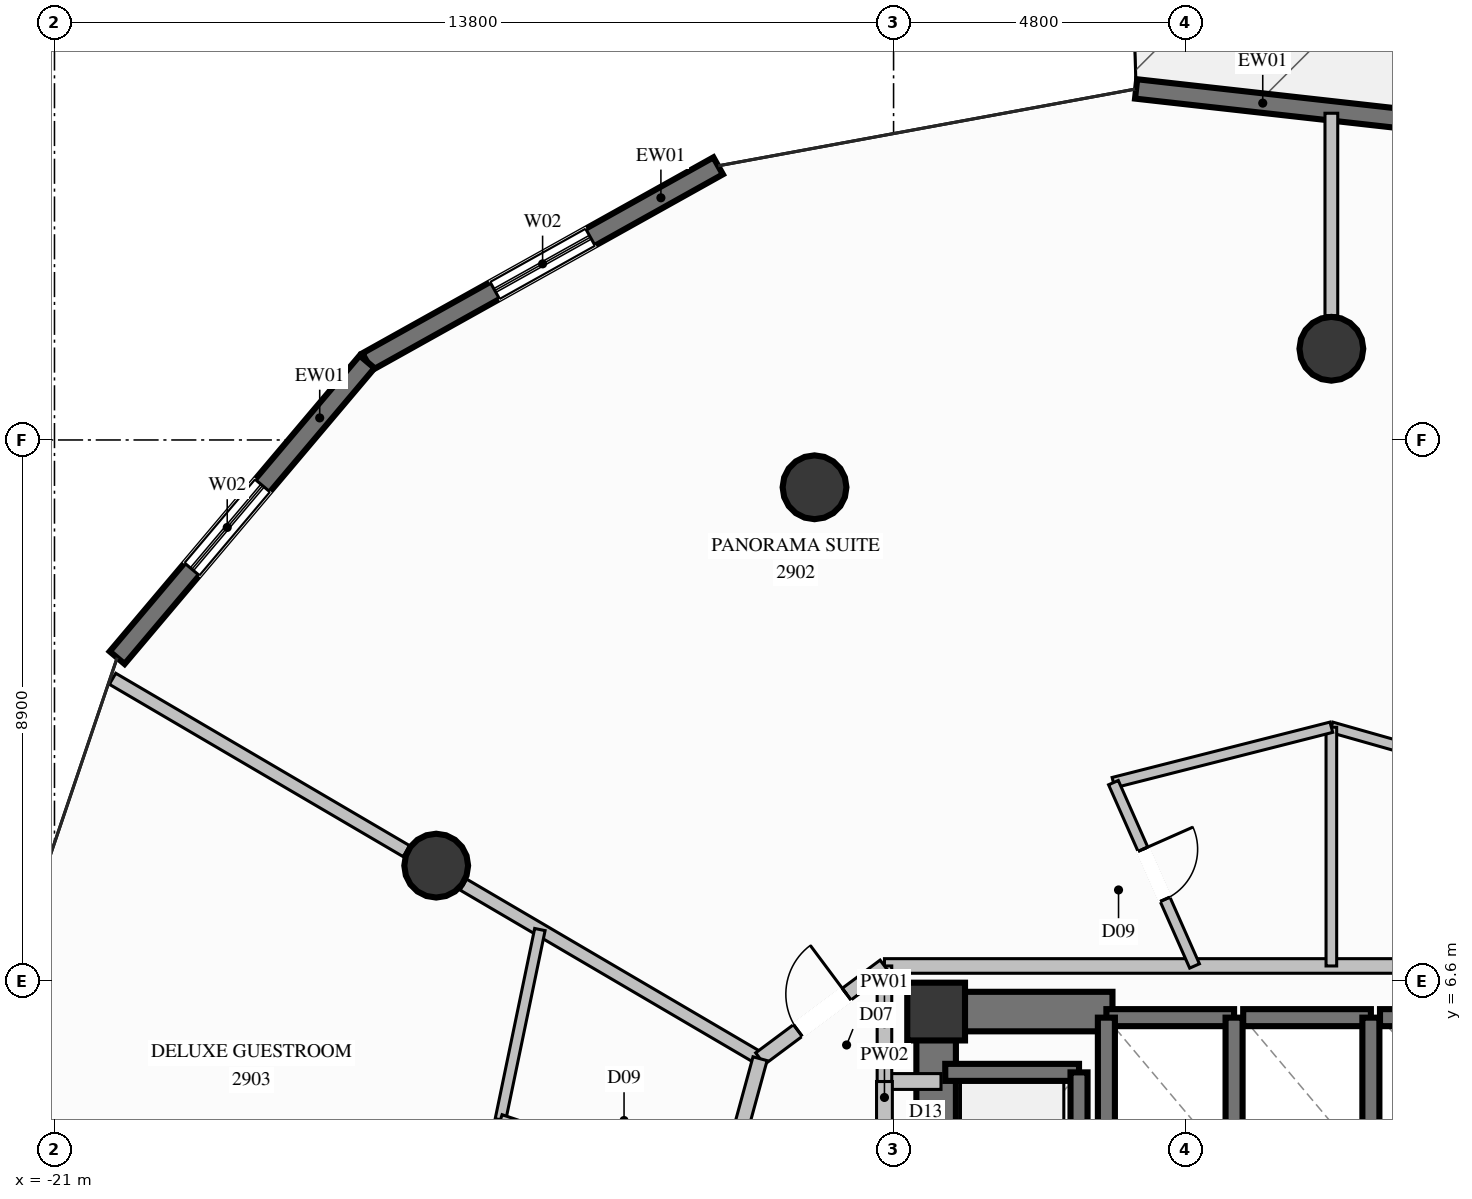
"""IFC4 building model, lengths in metres.
Left out: names, types, materials, properties, quantities, classifications, styles, units other than length and angle.
Written with IfcOpenShell. Run it as: python <this file> out.ifc"""

import sys

from ifc_helpers import new_model, si_unit, direction, frame, frame_2d, origin, origin_2d, place, context, subcontext, project, spatial, rectangle, circle, extrude, element, fill, save


model = new_model("IFC4")
c1 = context("Model", 3, precision=1e-05, world=origin(), true_north=direction((0.0, 1.0)))
c2 = subcontext(c1, "Body", "Model", "MODEL_VIEW")
j1 = project(units=[si_unit("LENGTHUNIT", "METRE"), si_unit("PLANEANGLEUNIT", "RADIAN")], contexts=[c1])
p1 = place(None, origin())
s1 = spatial("IfcSite", under=j1, at=p1, CompositionType="ELEMENT")
p2 = place(p1, origin())
s2 = spatial("IfcBuilding", under=s1, at=p2, CompositionType="ELEMENT")
p3 = place(p2, frame((0.0, 0.0, 109.8)))
s3 = spatial("IfcBuildingStorey", under=s2, at=p3, CompositionType="ELEMENT", Elevation=109.8)
p4 = place(p3, frame((-6.5, 6.1, 0.0), z_axis=(0.0, 0.0, 1.0), x_axis=(1.0, 0.0, 0.0)))
e1 = element("IfcColumn", 1, at=p4, inside=s3, PredefinedType="COLUMN", context=c2, shape_type="SweptSolid", body=[
    extrude(rectangle(XDim=0.95, YDim=0.95, at=origin_2d()), origin(), (0.0, 0.0, 1.0), 3.6),
])
p5 = place(p3, frame((-6.175, 6.1, 0.0), z_axis=(0.0, 0.0, 1.0), x_axis=(1.0, 0.0, 0.0)))
e2 = element("IfcWall", 2, at=p5, inside=s3, PredefinedType="SHEAR", context=c2, shape_type="SweptSolid", body=[
    extrude(rectangle(XDim=2.575, YDim=0.65, at=frame_2d((1.288, 0.0))), origin(), (0.0, 0.0, 1.0), 3.6),
])
p6 = place(p3, frame((-6.5, 2.35, 0.0), z_axis=(0.0, 0.0, 1.0), x_axis=(0.0, 1.0, 0.0)))
e3 = element("IfcWall", 3, at=p6, inside=s3, PredefinedType="SHEAR", context=c2, shape_type="SweptSolid", body=[
    extrude(rectangle(XDim=4.075, YDim=0.65, at=frame_2d((2.038, 0.0))), origin(), (0.0, 0.0, 1.0), 3.6),
])
for number, where, z_axis, x_axis in (
    (4, (0.0, 17.0, 0.0), (0.0, 0.0, 1.0), (1.0, 0.0, 0.0)),
    (5, (-8.5, 14.722, 0.0), (0.0, 0.0, 1.0), (1.0, 0.0, 0.0)),
    (6, (-14.722, 8.5, 0.0), (0.0, 0.0, 1.0), (1.0, 0.0, 0.0)),
):
    element("IfcColumn", number, at=place(p3, frame(where, z_axis=z_axis, x_axis=x_axis)), inside=s3, PredefinedType="COLUMN", context=c2, shape_type="SweptSolid", body=[
        extrude(circle(Radius=0.525, at=origin_2d()), origin(), (0.0, 0.0, 1.0), 3.6),
    ])
p7 = place(p3, frame((-3.211, 21.273, 0.0), z_axis=(0.0, 0.0, 1.0), x_axis=(0.993784044115, -0.111325081016, 0.0)))
e7 = element("IfcWall", 7, at=p7, inside=s3, PredefinedType="SOLIDWALL", context=c2, shape_type="SweptSolid", body=[
    extrude(rectangle(XDim=7.347, YDim=0.32, at=frame_2d((3.673, 0.0))), origin(), (0.0, 0.0, 1.0), 3.35),
])
p8 = place(p7, frame((4.441, 0.0, 0.35)))
e8 = element("IfcOpeningElement", 8, at=p8, cuts=e7, PredefinedType="OPENING", context=c2, shape_type="SweptSolid", body=[
    extrude(rectangle(XDim=1.8, YDim=2.6, at=frame_2d((0.9, 1.3))), frame((0.0, 0.17, 0.0), z_axis=(0.0, -1.0, 0.0), x_axis=(1.0, 0.0, 0.0)), (0.0, 0.0, 1.0), 0.34),
])
p9 = place(p3, frame((-15.859, 16.785, 0.0), z_axis=(0.0, 0.0, 1.0), x_axis=(0.873166276034, 0.487422459882, 0.0)))
e9 = element("IfcWall", 9, at=p9, inside=s3, PredefinedType="SOLIDWALL", context=c2, shape_type="SweptSolid", body=[
    extrude(rectangle(XDim=6.613, YDim=0.32, at=frame_2d((3.306, 0.0))), origin(), (0.0, 0.0, 1.0), 3.35),
])
p10 = place(p9, frame((2.406, 0.0, 0.35)))
e10 = element("IfcOpeningElement", 10, at=p10, cuts=e9, PredefinedType="OPENING", context=c2, shape_type="SweptSolid", body=[
    extrude(rectangle(XDim=1.8, YDim=2.6, at=frame_2d((0.9, 1.3))), frame((0.0, 0.17, 0.0), z_axis=(0.0, -1.0, 0.0), x_axis=(1.0, 0.0, 0.0)), (0.0, 0.0, 1.0), 0.34),
])
p11 = place(p3, frame((-19.969, 11.919, 0.0), z_axis=(0.0, 0.0, 1.0), x_axis=(0.645278763483, 0.763947195425, 0.0)))
e11 = element("IfcWall", 11, at=p11, inside=s3, PredefinedType="SOLIDWALL", context=c2, shape_type="SweptSolid", body=[
    extrude(rectangle(XDim=6.369, YDim=0.32, at=frame_2d((3.185, 0.0))), origin(), (0.0, 0.0, 1.0), 3.35),
])
p12 = place(p11, frame((1.905, 0.0, 0.35)))
e12 = element("IfcOpeningElement", 12, at=p12, cuts=e11, PredefinedType="OPENING", context=c2, shape_type="SweptSolid", body=[
    extrude(rectangle(XDim=1.8, YDim=2.6, at=frame_2d((0.9, 1.3))), frame((0.0, 0.17, 0.0), z_axis=(0.0, -1.0, 0.0), x_axis=(1.0, 0.0, 0.0)), (0.0, 0.0, 1.0), 0.34),
])
p13 = place(p3, frame((-1.6, 6.0, 0.0), z_axis=(0.0, 0.0, 1.0), x_axis=(-1.0, 0.0, 0.0)))
e13 = element("IfcWall", 13, at=p13, inside=s3, PredefinedType="SOLIDWALL", context=c2, shape_type="SweptSolid", body=[
    extrude(rectangle(XDim=2.1, YDim=0.28, at=frame_2d((1.05, 0.0))), origin(), (0.0, 0.0, 1.0), 3.35),
])
for number, where, z_axis, x_axis in (
    (14, (-3.7, 6.0, 0.0), (0.0, 0.0, 1.0), (0.0, -1.0, 0.0)),
    (15, (-1.6, 3.5, 0.0), (0.0, 0.0, 1.0), (0.0, 1.0, 0.0)),
):
    element("IfcWall", number, at=place(p3, frame(where, z_axis=z_axis, x_axis=x_axis)), inside=s3, PredefinedType="SOLIDWALL", context=c2, shape_type="SweptSolid", body=[
        extrude(rectangle(XDim=2.5, YDim=0.28, at=frame_2d((1.25, 0.0))), origin(), (0.0, 0.0, 1.0), 3.35),
    ])
p14 = place(p3, frame((0.65, 6.0, 0.0), z_axis=(0.0, 0.0, 1.0), x_axis=(-1.0, 0.0, 0.0)))
e16 = element("IfcWall", 16, at=p14, inside=s3, PredefinedType="SOLIDWALL", context=c2, shape_type="SweptSolid", body=[
    extrude(rectangle(XDim=2.1, YDim=0.28, at=frame_2d((1.05, 0.0))), origin(), (0.0, 0.0, 1.0), 3.35),
])
p15 = place(p3, frame((0.65, 3.5, 0.0), z_axis=(0.0, 0.0, 1.0), x_axis=(0.0, 1.0, 0.0)))
e17 = element("IfcWall", 17, at=p15, inside=s3, PredefinedType="SOLIDWALL", context=c2, shape_type="SweptSolid", body=[
    extrude(rectangle(XDim=2.5, YDim=0.28, at=frame_2d((1.25, 0.0))), origin(), (0.0, 0.0, 1.0), 3.35),
])
p16 = place(p3, frame((3.0, 6.0, 0.0), z_axis=(0.0, 0.0, 1.0), x_axis=(-1.0, 0.0, 0.0)))
e18 = element("IfcWall", 18, at=p16, inside=s3, PredefinedType="SOLIDWALL", context=c2, shape_type="SweptSolid", body=[
    extrude(rectangle(XDim=2.2, YDim=0.28, at=frame_2d((1.1, 0.0))), origin(), (0.0, 0.0, 1.0), 3.35),
])
p17 = place(p3, frame((-4.15, 5.1, 0.0), z_axis=(0.0, 0.0, 1.0), x_axis=(-1.0, 0.0, 0.0)))
e19 = element("IfcWall", 19, at=p17, inside=s3, PredefinedType="SOLIDWALL", context=c2, shape_type="SweptSolid", body=[
    extrude(rectangle(XDim=2.2, YDim=0.28, at=frame_2d((1.1, 0.0))), origin(), (0.0, 0.0, 1.0), 3.35),
])
p18 = place(p3, frame((-4.15, 2.4, 0.0), z_axis=(0.0, 0.0, 1.0), x_axis=(0.0, 1.0, 0.0)))
e20 = element("IfcWall", 20, at=p18, inside=s3, PredefinedType="SOLIDWALL", context=c2, shape_type="SweptSolid", body=[
    extrude(rectangle(XDim=2.7, YDim=0.28, at=frame_2d((1.35, 0.0))), origin(), (0.0, 0.0, 1.0), 3.35),
])
p19 = place(p3, frame((-7.35, 4.95, 0.0), z_axis=(0.0, 0.0, 1.0), x_axis=(1.0, 0.0, 0.0)))
e21 = element("IfcWall", 21, at=p19, inside=s3, PredefinedType="PARTITIONING", context=c2, shape_type="SweptSolid", body=[
    extrude(rectangle(XDim=0.93, YDim=0.26, at=frame_2d((0.465, 0.0))), origin(), (0.0, 0.0, 1.0), 3.35),
])
p20 = place(p3, frame((-7.35, 2.55, 0.0), z_axis=(0.0, 0.0, 1.0), x_axis=(0.0, 1.0, 0.0)))
e22 = element("IfcWall", 22, at=p20, inside=s3, PredefinedType="PARTITIONING", context=c2, shape_type="SweptSolid", body=[
    extrude(rectangle(XDim=2.4, YDim=0.26, at=frame_2d((1.2, 0.0))), origin(), (0.0, 0.0, 1.0), 2.435),
])
p21 = place(p20, frame((0.775, 0.0, 0.0)))
e23 = element("IfcOpeningElement", 23, at=p21, cuts=e22, PredefinedType="OPENING", context=c2, shape_type="SweptSolid", body=[
    extrude(rectangle(XDim=0.85, YDim=2.05, at=frame_2d((0.425, 1.025))), frame((0.0, 0.14, 0.0), z_axis=(0.0, -1.0, 0.0), x_axis=(1.0, 0.0, 0.0)), (0.0, 0.0, 1.0), 0.28),
])
p22 = place(p3, frame((-7.35, 6.85, 0.0), z_axis=(0.0, 0.0, 1.0), x_axis=(1.0, 0.0, 0.0)))
e24 = element("IfcWall", 24, at=p22, inside=s3, PredefinedType="PARTITIONING", context=c2, shape_type="SweptSolid", body=[
    extrude(rectangle(XDim=14.7, YDim=0.24, at=frame_2d((7.35, 0.0))), origin(), (0.0, 0.0, 1.0), 2.435),
])
p23 = place(p3, frame((-7.35, 4.95, 0.0), z_axis=(0.0, 0.0, 1.0), x_axis=(0.0, 1.0, 0.0)))
e25 = element("IfcWall", 25, at=p23, inside=s3, PredefinedType="PARTITIONING", context=c2, shape_type="SweptSolid", body=[
    extrude(rectangle(XDim=1.9, YDim=0.24, at=frame_2d((0.95, 0.0))), origin(), (0.0, 0.0, 1.0), 2.435),
])
p24 = place(p3, frame((-9.396, 5.325, 0.0), z_axis=(0.0, 0.0, 1.0), x_axis=(-0.862467386777, 0.50611264235, 0.0)))
e26 = element("IfcWall", 26, at=p24, inside=s3, PredefinedType="PARTITIONING", context=c2, shape_type="SweptSolid", body=[
    extrude(rectangle(XDim=5.657, YDim=0.21, at=frame_2d((2.829, 0.0))), origin(), (0.0, 0.0, 1.0), 2.791),
])
p25 = place(p3, frame((-15.212, 8.738, 0.0), z_axis=(0.0, 0.0, 1.0), x_axis=(-0.862556345738, 0.505961016706, 0.0)))
e27 = element("IfcWall", 27, at=p25, inside=s3, PredefinedType="PARTITIONING", context=c2, shape_type="SweptSolid", body=[
    extrude(rectangle(XDim=5.603, YDim=0.21, at=frame_2d((2.802, 0.0))), origin(), (0.0, 0.0, 1.0), 3.35),
])
p26 = place(p3, frame((0.0, 10.776, 0.0), z_axis=(0.0, 0.0, 1.0), x_axis=(0.962140957865, -0.272552338459, 0.0)))
e28 = element("IfcWall", 28, at=p26, inside=s3, PredefinedType="PLUMBINGWALL", context=c2, shape_type="SweptSolid", body=[
    extrude(rectangle(XDim=3.599, YDim=0.175, at=frame_2d((1.8, 0.0))), origin(), (0.0, 0.0, 1.0), 2.985),
])
p27 = place(p3, frame((0.0, 10.776, 0.0), z_axis=(0.0, 0.0, 1.0), x_axis=(0.0, -1.0, 0.0)))
e29 = element("IfcWall", 29, at=p27, inside=s3, PredefinedType="PLUMBINGWALL", context=c2, shape_type="SweptSolid", body=[
    extrude(rectangle(XDim=3.926, YDim=0.175, at=frame_2d((1.963, 0.0))), origin(), (0.0, 0.0, 1.0), 3.35),
])
p28 = place(p3, frame((0.0, 17.545, 0.0), z_axis=(0.0, 0.0, 1.0), x_axis=(0.0, 1.0, 0.0)))
e30 = element("IfcWall", 30, at=p28, inside=s3, PredefinedType="PARTITIONING", context=c2, shape_type="SweptSolid", body=[
    extrude(rectangle(XDim=3.328, YDim=0.21, at=frame_2d((1.664, 0.0))), origin(), (0.0, 0.0, 1.0), 3.35),
])
p29 = place(p3, frame((-3.584, 9.865, 0.0), z_axis=(0.0, 0.0, 1.0), x_axis=(0.969187500781, 0.246324152957, 0.0)))
e31 = element("IfcWall", 31, at=p29, inside=s3, PredefinedType="PLUMBINGWALL", context=c2, shape_type="SweptSolid", body=[
    extrude(rectangle(XDim=3.698, YDim=0.175, at=frame_2d((1.849, 0.0))), origin(), (0.0, 0.0, 1.0), 2.985),
])
p30 = place(p3, frame((-3.584, 9.865, 0.0), z_axis=(0.0, 0.0, 1.0), x_axis=(0.404626310395, -0.914482120621, 0.0)))
e32 = element("IfcWall", 32, at=p30, inside=s3, PredefinedType="PLUMBINGWALL", context=c2, shape_type="SweptSolid", body=[
    extrude(rectangle(XDim=3.297, YDim=0.175, at=frame_2d((1.648, 0.0))), origin(), (0.0, 0.0, 1.0), 3.35),
])
p31 = place(p30, frame((1.198, 0.0, 0.0)))
e33 = element("IfcOpeningElement", 33, at=p31, cuts=e32, PredefinedType="OPENING", context=c2, shape_type="SweptSolid", body=[
    extrude(rectangle(XDim=0.9, YDim=2.1, at=frame_2d((0.45, 1.05))), frame((0.0, 0.098, 0.0), z_axis=(0.0, -1.0, 0.0), x_axis=(1.0, 0.0, 0.0)), (0.0, 0.0, 1.0), 0.195),
])
p32 = place(p3, frame((-9.396, 5.325, 0.0), z_axis=(0.0, 0.0, 1.0), x_axis=(0.8017416961, 0.597670689205, 0.0)))
e34 = element("IfcWall", 34, at=p32, inside=s3, PredefinedType="PARTITIONING", context=c2, shape_type="SweptSolid", body=[
    extrude(rectangle(XDim=2.552, YDim=0.24, at=frame_2d((1.276, 0.0))), origin(), (0.0, 0.0, 1.0), 3.35),
])
p33 = place(p32, frame((0.776, 0.0, 0.0)))
e35 = element("IfcOpeningElement", 35, at=p33, cuts=e34, PredefinedType="OPENING", context=c2, shape_type="SweptSolid", body=[
    extrude(rectangle(XDim=1.0, YDim=2.2, at=frame_2d((0.5, 1.1))), frame((0.0, 0.13, 0.0), z_axis=(0.0, -1.0, 0.0), x_axis=(1.0, 0.0, 0.0)), (0.0, 0.0, 1.0), 0.26),
])
p34 = place(p3, frame((-9.396, 5.325, 0.0), z_axis=(0.0, 0.0, 1.0), x_axis=(-0.263643210908, -0.964620265878, 0.0)))
e36 = element("IfcWall", 36, at=p34, inside=s3, PredefinedType="PARTITIONING", context=c2, shape_type="SweptSolid", body=[
    extrude(rectangle(XDim=2.318, YDim=0.24, at=frame_2d((1.159, 0.0))), origin(), (0.0, 0.0, 1.0), 3.35),
])
p35 = place(p3, frame((-13.017, 7.449, 0.0), z_axis=(0.0, 0.0, 1.0), x_axis=(-0.203136275653, -0.979150475419, 0.0)))
e37 = element("IfcWall", 37, at=p35, inside=s3, PredefinedType="PLUMBINGWALL", context=c2, shape_type="SweptSolid", body=[
    extrude(rectangle(XDim=3.195, YDim=0.175, at=frame_2d((1.597, 0.0))), origin(), (0.0, 0.0, 1.0), 3.35),
])
p36 = place(p3, frame((-10.007, 3.089, 0.0), z_axis=(0.0, 0.0, 1.0), x_axis=(-0.947724103288, 0.319090933822, 0.0)))
e38 = element("IfcWall", 38, at=p36, inside=s3, PredefinedType="PLUMBINGWALL", context=c2, shape_type="SweptSolid", body=[
    extrude(rectangle(XDim=3.861, YDim=0.175, at=frame_2d((1.93, 0.0))), origin(), (0.0, 0.0, 1.0), 3.35),
])
p37 = place(p36, frame((1.48, 0.0, 0.0)))
e39 = element("IfcOpeningElement", 39, at=p37, cuts=e38, PredefinedType="OPENING", context=c2, shape_type="SweptSolid", body=[
    extrude(rectangle(XDim=0.9, YDim=2.1, at=frame_2d((0.45, 1.05))), frame((0.0, 0.098, 0.0), z_axis=(0.0, -1.0, 0.0), x_axis=(1.0, 0.0, 0.0)), (0.0, 0.0, 1.0), 0.195),
])
p38 = place(p10, origin())
e40 = element("IfcWindow", 40, at=p38, inside=s3, PartitioningType="SINGLE_PANEL", PredefinedType="WINDOW", context=c2, shape_type="SweptSolid", body=[
    extrude(rectangle(XDim=1.8, YDim=2.6, at=frame_2d((0.9, 1.3))), frame((0.0, 0.03, 0.0), z_axis=(0.0, -1.0, 0.0), x_axis=(1.0, 0.0, 0.0)), (0.0, 0.0, 1.0), 0.06),
])
fill(e10, e40)
p39 = place(p12, origin())
e41 = element("IfcWindow", 41, at=p39, inside=s3, PartitioningType="SINGLE_PANEL", PredefinedType="WINDOW", context=c2, shape_type="SweptSolid", body=[
    extrude(rectangle(XDim=1.8, YDim=2.6, at=frame_2d((0.9, 1.3))), frame((0.0, 0.03, 0.0), z_axis=(0.0, -1.0, 0.0), x_axis=(1.0, 0.0, 0.0)), (0.0, 0.0, 1.0), 0.06),
])
fill(e12, e41)
p40 = place(p31, origin())
e42 = element("IfcDoor", 42, at=p40, inside=s3, OperationType="SINGLE_SWING_LEFT", PredefinedType="DOOR", context=c2, shape_type="SweptSolid", body=[
    extrude(rectangle(XDim=0.9, YDim=2.1, at=frame_2d((0.45, 1.05))), frame((0.0, 0.025, 0.0), z_axis=(0.0, -1.0, 0.0), x_axis=(1.0, 0.0, 0.0)), (0.0, 0.0, 1.0), 0.05),
])
fill(e33, e42)
p41 = place(p33, origin())
e43 = element("IfcDoor", 43, at=p41, inside=s3, OperationType="SINGLE_SWING_RIGHT", PredefinedType="DOOR", context=c2, shape_type="SweptSolid", body=[
    extrude(rectangle(XDim=1.0, YDim=2.2, at=frame_2d((0.5, 1.1))), frame((0.0, 0.025, 0.0), z_axis=(0.0, -1.0, 0.0), x_axis=(1.0, 0.0, 0.0)), (0.0, 0.0, 1.0), 0.05),
])
fill(e35, e43)
save(model, sys.argv[1])
